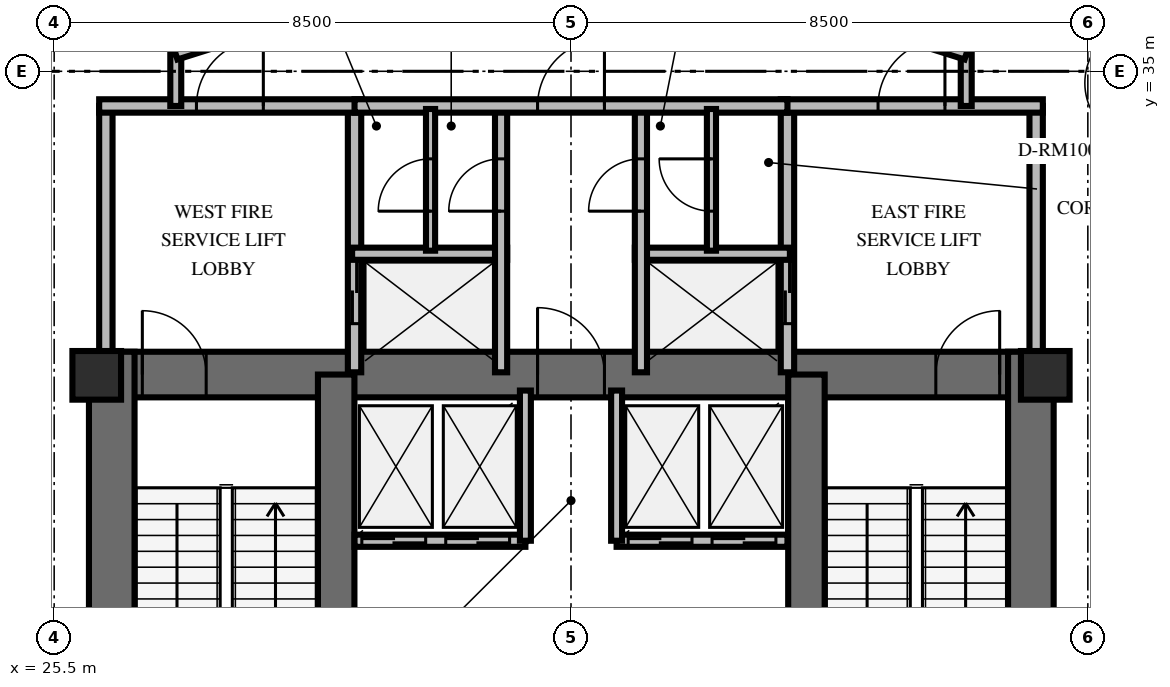
"""IFC4 building model, lengths in metres.
Left out: names, types, materials, properties, quantities, classifications, styles, units other than length and angle.
Written with IfcOpenShell. Run it as: python <this file> out.ifc"""

import sys

from ifc_helpers import new_model, si_unit, direction, frame, frame_2d, origin, origin_2d, place, context, subcontext, project, spatial, rectangle, extrude, element, fill, save


model = new_model("IFC4")
c1 = context("Model", 3, precision=1e-05, world=origin(), true_north=direction((0.0, 1.0)))
c2 = subcontext(c1, "Body", "Model", "MODEL_VIEW")
j1 = project(units=[si_unit("LENGTHUNIT", "METRE"), si_unit("PLANEANGLEUNIT", "RADIAN")], contexts=[c1])
p1 = place(None, origin())
s1 = spatial("IfcSite", under=j1, at=p1, CompositionType="ELEMENT")
p2 = place(p1, origin())
s2 = spatial("IfcBuilding", under=s1, at=p2, CompositionType="ELEMENT")
p3 = place(p2, frame((0.0, 0.0, 177.2)))
s3 = spatial("IfcBuildingStorey", under=s2, at=p3, CompositionType="ELEMENT", Elevation=177.2)
p4 = place(p3, frame((26.072, 30.013, 0.0), z_axis=(0.0, 0.0, 1.0), x_axis=(1.0, 0.0, 0.0)))
e1 = element("IfcWall", 1, at=p4, inside=s3, PredefinedType="SHEAR", context=c2, shape_type="SweptSolid", body=[
    extrude(rectangle(XDim=15.866, YDim=0.75, at=frame_2d((7.933, 0.0))), origin(), (0.0, 0.0, 1.0), 3.6),
])
p5 = place(p4, frame((0.878, 0.0, 0.0)))
e2 = element("IfcOpeningElement", 2, at=p5, cuts=e1, PredefinedType="OPENING", context=c2, shape_type="SweptSolid", body=[
    extrude(rectangle(XDim=1.05, YDim=2.15, at=frame_2d((0.525, 1.075))), frame((0.0, 0.385, 0.0), z_axis=(0.0, -1.0, 0.0), x_axis=(1.0, 0.0, 0.0)), (0.0, 0.0, 1.0), 0.77),
])
p6 = place(p4, frame((13.928, 0.0, 0.0)))
e3 = element("IfcOpeningElement", 3, at=p6, cuts=e1, PredefinedType="OPENING", context=c2, shape_type="SweptSolid", body=[
    extrude(rectangle(XDim=1.05, YDim=2.15, at=frame_2d((0.525, 1.075))), frame((0.0, 0.385, 0.0), z_axis=(0.0, -1.0, 0.0), x_axis=(1.0, 0.0, 0.0)), (0.0, 0.0, 1.0), 0.77),
])
p7 = place(p4, frame((7.378, 0.0, 0.0)))
e4 = element("IfcOpeningElement", 4, at=p7, cuts=e1, PredefinedType="OPENING", context=c2, shape_type="SweptSolid", body=[
    extrude(rectangle(XDim=1.1, YDim=2.15, at=frame_2d((0.55, 1.075))), frame((0.0, 0.385, 0.0), z_axis=(0.0, -1.0, 0.0), x_axis=(1.0, 0.0, 0.0)), (0.0, 0.0, 1.0), 0.77),
])
for number, where, z_axis, x_axis in (
    (5, (26.447, 19.812, 0.0), (0.0, 0.0, 1.0), (0.0, 1.0, 0.0)),
    (6, (41.563, 19.812, 0.0), (0.0, 0.0, 1.0), (0.0, 1.0, 0.0)),
):
    element("IfcWall", number, at=place(p3, frame(where, z_axis=z_axis, x_axis=x_axis)), inside=s3, PredefinedType="SHEAR", context=c2, shape_type="SweptSolid", body=[
        extrude(rectangle(XDim=10.576, YDim=0.75, at=frame_2d((5.288, 0.0))), origin(), (0.0, 0.0, 1.0), 3.6),
    ])
for number, where, z_axis, x_axis in (
    (7, (30.138, 20.187, 0.0), (0.0, 0.0, 1.0), (0.0, 1.0, 0.0)),
    (8, (37.872, 20.187, 0.0), (0.0, 0.0, 1.0), (0.0, 1.0, 0.0)),
):
    element("IfcWall", number, at=place(p3, frame(where, z_axis=z_axis, x_axis=x_axis)), inside=s3, PredefinedType="SHEAR", context=c2, shape_type="SweptSolid", body=[
        extrude(rectangle(XDim=9.826, YDim=0.6, at=frame_2d((4.913, 0.0))), origin(), (0.0, 0.0, 1.0), 3.6),
    ])
for number, where, z_axis, x_axis in (
    (9, (26.2, 30.0, 0.0), (0.0, 0.0, 1.0), (1.0, 0.0, 0.0)),
    (10, (41.8, 30.0, 0.0), (0.0, 0.0, 1.0), (1.0, 0.0, 0.0)),
):
    element("IfcColumn", number, at=place(p3, frame(where, z_axis=z_axis, x_axis=x_axis)), inside=s3, PredefinedType="PILASTER", context=c2, shape_type="SweptSolid", body=[
        extrude(rectangle(XDim=0.8, YDim=0.8, at=origin_2d()), origin(), (0.0, 0.0, 1.0), 3.6),
    ])
p8 = place(p3, frame((26.35, 30.05, 0.0), z_axis=(0.0, 0.0, 1.0), x_axis=(0.0, 1.0, 0.0)))
e11 = element("IfcWall", 11, at=p8, inside=s3, PredefinedType="SOLIDWALL", context=c2, shape_type="SweptSolid", body=[
    extrude(rectangle(XDim=4.38, YDim=0.22, at=frame_2d((2.19, 0.0))), origin(), (0.0, 0.0, 1.0), 2.46),
])
p9 = place(p3, frame((30.44, 30.05, 0.0), z_axis=(0.0, 0.0, 1.0), x_axis=(0.0, 1.0, 0.0)))
e12 = element("IfcWall", 12, at=p9, inside=s3, PredefinedType="SOLIDWALL", context=c2, shape_type="SweptSolid", body=[
    extrude(rectangle(XDim=4.38, YDim=0.22, at=frame_2d((2.19, 0.0))), origin(), (0.0, 0.0, 1.0), 2.46),
])
p10 = place(p9, frame((0.8, 0.0, 0.0)))
e13 = element("IfcOpeningElement", 13, at=p10, cuts=e12, PredefinedType="OPENING", context=c2, shape_type="SweptSolid", body=[
    extrude(rectangle(XDim=1.05, YDim=2.1, at=frame_2d((0.525, 1.05))), frame((0.0, 0.12, 0.0), z_axis=(0.0, -1.0, 0.0), x_axis=(1.0, 0.0, 0.0)), (0.0, 0.0, 1.0), 0.24),
])
p11 = place(p3, frame((26.24, 34.43, 0.0), z_axis=(0.0, 0.0, 1.0), x_axis=(1.0, 0.0, 0.0)))
e14 = element("IfcWall", 14, at=p11, inside=s3, PredefinedType="SOLIDWALL", context=c2, shape_type="SweptSolid", body=[
    extrude(rectangle(XDim=4.31, YDim=0.22, at=frame_2d((2.155, 0.0))), origin(), (0.0, 0.0, 1.0), 2.46),
])
p12 = place(p11, frame((1.6, 0.0, 0.0)))
e15 = element("IfcOpeningElement", 15, at=p12, cuts=e14, PredefinedType="OPENING", context=c2, shape_type="SweptSolid", body=[
    extrude(rectangle(XDim=1.1, YDim=2.15, at=frame_2d((0.55, 1.075))), frame((0.0, 0.12, 0.0), z_axis=(0.0, -1.0, 0.0), x_axis=(1.0, 0.0, 0.0)), (0.0, 0.0, 1.0), 0.24),
])
p13 = place(p3, frame((30.4, 32.0, 0.0), z_axis=(0.0, 0.0, 1.0), x_axis=(1.0, 0.0, 0.0)))
e16 = element("IfcWall", 16, at=p13, inside=s3, PredefinedType="SOLIDWALL", context=c2, shape_type="SweptSolid", body=[
    extrude(rectangle(XDim=2.55, YDim=0.2, at=frame_2d((1.275, 0.0))), origin(), (0.0, 0.0, 1.0), 2.46),
])
p14 = place(p3, frame((32.85, 30.05, 0.0), z_axis=(0.0, 0.0, 1.0), x_axis=(0.0, 1.0, 0.0)))
e17 = element("IfcWall", 17, at=p14, inside=s3, PredefinedType="SOLIDWALL", context=c2, shape_type="SweptSolid", body=[
    extrude(rectangle(XDim=4.38, YDim=0.2, at=frame_2d((2.19, 0.0))), origin(), (0.0, 0.0, 1.0), 2.46),
])
p15 = place(p14, frame((2.65, 0.0, 0.0)))
e18 = element("IfcOpeningElement", 18, at=p15, cuts=e17, PredefinedType="OPENING", context=c2, shape_type="SweptSolid", body=[
    extrude(rectangle(XDim=0.86, YDim=2.05, at=frame_2d((0.43, 1.025))), frame((0.0, 0.11, 0.0), z_axis=(0.0, -1.0, 0.0), x_axis=(1.0, 0.0, 0.0)), (0.0, 0.0, 1.0), 0.22),
])
p16 = place(p3, frame((37.56, 30.05, 0.0), z_axis=(0.0, 0.0, 1.0), x_axis=(0.0, 1.0, 0.0)))
e19 = element("IfcWall", 19, at=p16, inside=s3, PredefinedType="SOLIDWALL", context=c2, shape_type="SweptSolid", body=[
    extrude(rectangle(XDim=4.38, YDim=0.22, at=frame_2d((2.19, 0.0))), origin(), (0.0, 0.0, 1.0), 2.46),
])
p17 = place(p16, frame((0.8, 0.0, 0.0)))
e20 = element("IfcOpeningElement", 20, at=p17, cuts=e19, PredefinedType="OPENING", context=c2, shape_type="SweptSolid", body=[
    extrude(rectangle(XDim=1.05, YDim=2.1, at=frame_2d((0.525, 1.05))), frame((0.0, 0.12, 0.0), z_axis=(0.0, -1.0, 0.0), x_axis=(1.0, 0.0, 0.0)), (0.0, 0.0, 1.0), 0.24),
])
p18 = place(p3, frame((41.65, 30.05, 0.0), z_axis=(0.0, 0.0, 1.0), x_axis=(0.0, 1.0, 0.0)))
e21 = element("IfcWall", 21, at=p18, inside=s3, PredefinedType="SOLIDWALL", context=c2, shape_type="SweptSolid", body=[
    extrude(rectangle(XDim=4.38, YDim=0.22, at=frame_2d((2.19, 0.0))), origin(), (0.0, 0.0, 1.0), 2.46),
])
p19 = place(p3, frame((37.45, 34.43, 0.0), z_axis=(0.0, 0.0, 1.0), x_axis=(1.0, 0.0, 0.0)))
e22 = element("IfcWall", 22, at=p19, inside=s3, PredefinedType="SOLIDWALL", context=c2, shape_type="SweptSolid", body=[
    extrude(rectangle(XDim=4.31, YDim=0.22, at=frame_2d((2.155, 0.0))), origin(), (0.0, 0.0, 1.0), 2.46),
])
p20 = place(p19, frame((1.6, 0.0, 0.0)))
e23 = element("IfcOpeningElement", 23, at=p20, cuts=e22, PredefinedType="OPENING", context=c2, shape_type="SweptSolid", body=[
    extrude(rectangle(XDim=1.1, YDim=2.15, at=frame_2d((0.55, 1.075))), frame((0.0, 0.12, 0.0), z_axis=(0.0, -1.0, 0.0), x_axis=(1.0, 0.0, 0.0)), (0.0, 0.0, 1.0), 0.24),
])
p21 = place(p3, frame((35.05, 32.0, 0.0), z_axis=(0.0, 0.0, 1.0), x_axis=(1.0, 0.0, 0.0)))
e24 = element("IfcWall", 24, at=p21, inside=s3, PredefinedType="SOLIDWALL", context=c2, shape_type="SweptSolid", body=[
    extrude(rectangle(XDim=2.55, YDim=0.2, at=frame_2d((1.275, 0.0))), origin(), (0.0, 0.0, 1.0), 2.46),
])
p22 = place(p3, frame((35.15, 30.05, 0.0), z_axis=(0.0, 0.0, 1.0), x_axis=(0.0, 1.0, 0.0)))
e25 = element("IfcWall", 25, at=p22, inside=s3, PredefinedType="SOLIDWALL", context=c2, shape_type="SweptSolid", body=[
    extrude(rectangle(XDim=4.38, YDim=0.2, at=frame_2d((2.19, 0.0))), origin(), (0.0, 0.0, 1.0), 2.46),
])
p23 = place(p22, frame((2.65, 0.0, 0.0)))
e26 = element("IfcOpeningElement", 26, at=p23, cuts=e25, PredefinedType="OPENING", context=c2, shape_type="SweptSolid", body=[
    extrude(rectangle(XDim=0.86, YDim=2.05, at=frame_2d((0.43, 1.025))), frame((0.0, 0.11, 0.0), z_axis=(0.0, -1.0, 0.0), x_axis=(1.0, 0.0, 0.0)), (0.0, 0.0, 1.0), 0.22),
])
p24 = place(p3, frame((30.44, 34.43, 0.0), z_axis=(0.0, 0.0, 1.0), x_axis=(1.0, 0.0, 0.0)))
e27 = element("IfcWall", 27, at=p24, inside=s3, PredefinedType="SOLIDWALL", context=c2, shape_type="SweptSolid", body=[
    extrude(rectangle(XDim=7.12, YDim=0.22, at=frame_2d((3.56, 0.0))), origin(), (0.0, 0.0, 1.0), 2.46),
])
p25 = place(p24, frame((3.01, 0.0, 0.0)))
e28 = element("IfcOpeningElement", 28, at=p25, cuts=e27, PredefinedType="OPENING", context=c2, shape_type="SweptSolid", body=[
    extrude(rectangle(XDim=1.1, YDim=2.15, at=frame_2d((0.55, 1.075))), frame((0.0, 0.12, 0.0), z_axis=(0.0, -1.0, 0.0), x_axis=(1.0, 0.0, 0.0)), (0.0, 0.0, 1.0), 0.24),
])
p26 = place(p3, frame((31.69, 32.05, 0.0), z_axis=(0.0, 0.0, 1.0), x_axis=(0.0, 1.0, 0.0)))
e29 = element("IfcWall", 29, at=p26, inside=s3, PredefinedType="PARTITIONING", context=c2, shape_type="SweptSolid", body=[
    extrude(rectangle(XDim=2.33, YDim=0.15, at=frame_2d((1.165, 0.0))), origin(), (0.0, 0.0, 1.0), 2.46),
])
p27 = place(p26, frame((0.65, 0.0, 0.0)))
e30 = element("IfcOpeningElement", 30, at=p27, cuts=e29, PredefinedType="OPENING", context=c2, shape_type="SweptSolid", body=[
    extrude(rectangle(XDim=0.86, YDim=2.05, at=frame_2d((0.43, 1.025))), frame((0.0, 0.085, 0.0), z_axis=(0.0, -1.0, 0.0), x_axis=(1.0, 0.0, 0.0)), (0.0, 0.0, 1.0), 0.17),
])
p28 = place(p3, frame((36.31, 32.05, 0.0), z_axis=(0.0, 0.0, 1.0), x_axis=(0.0, 1.0, 0.0)))
e31 = element("IfcWall", 31, at=p28, inside=s3, PredefinedType="PARTITIONING", context=c2, shape_type="SweptSolid", body=[
    extrude(rectangle(XDim=2.33, YDim=0.15, at=frame_2d((1.165, 0.0))), origin(), (0.0, 0.0, 1.0), 2.46),
])
p29 = place(p28, frame((0.65, 0.0, 0.0)))
e32 = element("IfcOpeningElement", 32, at=p29, cuts=e31, PredefinedType="OPENING", context=c2, shape_type="SweptSolid", body=[
    extrude(rectangle(XDim=0.86, YDim=2.05, at=frame_2d((0.43, 1.025))), frame((0.0, 0.085, 0.0), z_axis=(0.0, -1.0, 0.0), x_axis=(1.0, 0.0, 0.0)), (0.0, 0.0, 1.0), 0.17),
])
p30 = place(p3, frame((30.44, 27.28, 0.0), z_axis=(0.0, 0.0, 1.0), x_axis=(1.0, 0.0, 0.0)))
e33 = element("IfcWall", 33, at=p30, inside=s3, PredefinedType="SOLIDWALL", context=c2, shape_type="SweptSolid", body=[
    extrude(rectangle(XDim=2.81, YDim=0.2, at=frame_2d((1.405, 0.0))), origin(), (0.0, 0.0, 1.0), 2.46),
])
p31 = place(p30, frame((0.12, 0.0, 0.0)))
e34 = element("IfcOpeningElement", 34, at=p31, cuts=e33, PredefinedType="OPENING", context=c2, shape_type="SweptSolid", body=[
    extrude(rectangle(XDim=1.05, YDim=2.1, at=frame_2d((0.525, 1.05))), frame((0.0, 0.11, 0.0), z_axis=(0.0, -1.0, 0.0), x_axis=(1.0, 0.0, 0.0)), (0.0, 0.0, 1.0), 0.22),
])
p32 = place(p30, frame((1.5, 0.0, 0.0)))
e35 = element("IfcOpeningElement", 35, at=p32, cuts=e33, PredefinedType="OPENING", context=c2, shape_type="SweptSolid", body=[
    extrude(rectangle(XDim=1.05, YDim=2.1, at=frame_2d((0.525, 1.05))), frame((0.0, 0.11, 0.0), z_axis=(0.0, -1.0, 0.0), x_axis=(1.0, 0.0, 0.0)), (0.0, 0.0, 1.0), 0.22),
])
p33 = place(p3, frame((33.25, 27.28, 0.0), z_axis=(0.0, 0.0, 1.0), x_axis=(0.0, 1.0, 0.0)))
e36 = element("IfcWall", 36, at=p33, inside=s3, PredefinedType="SOLIDWALL", context=c2, shape_type="SweptSolid", body=[
    extrude(rectangle(XDim=2.47, YDim=0.18, at=frame_2d((1.235, 0.0))), origin(), (0.0, 0.0, 1.0), 2.46),
])
p34 = place(p3, frame((34.75, 27.28, 0.0), z_axis=(0.0, 0.0, 1.0), x_axis=(1.0, 0.0, 0.0)))
e37 = element("IfcWall", 37, at=p34, inside=s3, PredefinedType="SOLIDWALL", context=c2, shape_type="SweptSolid", body=[
    extrude(rectangle(XDim=2.81, YDim=0.2, at=frame_2d((1.405, 0.0))), origin(), (0.0, 0.0, 1.0), 2.46),
])
p35 = place(p34, frame((0.19, 0.0, 0.0)))
e38 = element("IfcOpeningElement", 38, at=p35, cuts=e37, PredefinedType="OPENING", context=c2, shape_type="SweptSolid", body=[
    extrude(rectangle(XDim=1.05, YDim=2.1, at=frame_2d((0.525, 1.05))), frame((0.0, 0.11, 0.0), z_axis=(0.0, -1.0, 0.0), x_axis=(1.0, 0.0, 0.0)), (0.0, 0.0, 1.0), 0.22),
])
p36 = place(p34, frame((1.57, 0.0, 0.0)))
e39 = element("IfcOpeningElement", 39, at=p36, cuts=e37, PredefinedType="OPENING", context=c2, shape_type="SweptSolid", body=[
    extrude(rectangle(XDim=1.05, YDim=2.1, at=frame_2d((0.525, 1.05))), frame((0.0, 0.11, 0.0), z_axis=(0.0, -1.0, 0.0), x_axis=(1.0, 0.0, 0.0)), (0.0, 0.0, 1.0), 0.22),
])
p37 = place(p3, frame((34.75, 27.28, 0.0), z_axis=(0.0, 0.0, 1.0), x_axis=(0.0, 1.0, 0.0)))
e40 = element("IfcWall", 40, at=p37, inside=s3, PredefinedType="SOLIDWALL", context=c2, shape_type="SweptSolid", body=[
    extrude(rectangle(XDim=2.47, YDim=0.18, at=frame_2d((1.235, 0.0))), origin(), (0.0, 0.0, 1.0), 2.46),
])
for number, where, z_axis, x_axis in (
    (41, (27.5, 34.43, 0.0), (0.0, 0.0, 1.0), (0.0, 1.0, 0.0)),
    (42, (40.5, 35.28, 0.0), (0.0, 0.0, 1.0), (0.0, -1.0, 0.0)),
):
    element("IfcWall", number, at=place(p3, frame(where, z_axis=z_axis, x_axis=x_axis)), inside=s3, PredefinedType="PARTITIONING", context=c2, shape_type="SweptSolid", body=[
        extrude(rectangle(XDim=0.85, YDim=0.18, at=frame_2d((0.425, 0.0))), origin(), (0.0, 0.0, 1.0), 2.46),
    ])
p38 = place(p3, frame((27.5, 35.28, 0.0), z_axis=(0.0, 0.0, 1.0), x_axis=(0.953691418528, 0.300786765376, 0.0)))
e43 = element("IfcWall", 43, at=p38, inside=s3, PredefinedType="PARTITIONING", context=c2, shape_type="SweptSolid", body=[
    extrude(rectangle(XDim=6.816, YDim=0.18, at=frame_2d((3.408, 0.0))), origin(), (0.0, 0.0, 1.0), 2.46),
])
p39 = place(p38, frame((2.858, 0.0, 0.0)))
e44 = element("IfcOpeningElement", 44, at=p39, cuts=e43, PredefinedType="OPENING", context=c2, shape_type="SweptSolid", body=[
    extrude(rectangle(XDim=1.1, YDim=2.15, at=frame_2d((0.55, 1.075))), frame((0.0, 0.1, 0.0), z_axis=(0.0, -1.0, 0.0), x_axis=(1.0, 0.0, 0.0)), (0.0, 0.0, 1.0), 0.2),
])
p40 = place(p3, frame((34.0, 37.33, 0.0), z_axis=(0.0, 0.0, 1.0), x_axis=(0.953691418528, -0.300786765376, 0.0)))
e45 = element("IfcWall", 45, at=p40, inside=s3, PredefinedType="PARTITIONING", context=c2, shape_type="SweptSolid", body=[
    extrude(rectangle(XDim=6.816, YDim=0.18, at=frame_2d((3.408, 0.0))), origin(), (0.0, 0.0, 1.0), 2.46),
])
p41 = place(p40, frame((2.858, 0.0, 0.0)))
e46 = element("IfcOpeningElement", 46, at=p41, cuts=e45, PredefinedType="OPENING", context=c2, shape_type="SweptSolid", body=[
    extrude(rectangle(XDim=1.1, YDim=2.15, at=frame_2d((0.55, 1.075))), frame((0.0, 0.1, 0.0), z_axis=(0.0, -1.0, 0.0), x_axis=(1.0, 0.0, 0.0)), (0.0, 0.0, 1.0), 0.2),
])
p42 = place(p3, frame((44.547, 33.719, 0.0), z_axis=(0.0, 0.0, 1.0), x_axis=(-0.709580149613, 0.704624730815, 0.0)))
e47 = element("IfcWall", 47, at=p42, inside=s3, PredefinedType="PARTITIONING", context=c2, shape_type="SweptSolid", body=[
    extrude(rectangle(XDim=4.089, YDim=0.18, at=frame_2d((2.044, 0.0))), origin(), (0.0, 0.0, 1.0), 2.46),
])
p43 = place(p42, frame((1.545, 0.0, 0.0)))
e48 = element("IfcOpeningElement", 48, at=p43, cuts=e47, PredefinedType="OPENING", context=c2, shape_type="SweptSolid", body=[
    extrude(rectangle(XDim=1.0, YDim=2.15, at=frame_2d((0.5, 1.075))), frame((0.0, 0.1, 0.0), z_axis=(0.0, -1.0, 0.0), x_axis=(1.0, 0.0, 0.0)), (0.0, 0.0, 1.0), 0.2),
])
p44 = place(p3, frame((28.642, 37.921, 0.0), z_axis=(0.0, 0.0, 1.0), x_axis=(-0.82708553546, -0.56207607762, 0.0)))
e49 = element("IfcWall", 49, at=p44, inside=s3, PredefinedType="PARTITIONING", context=c2, shape_type="SweptSolid", body=[
    extrude(rectangle(XDim=4.539, YDim=0.18, at=frame_2d((2.27, 0.0))), origin(), (0.0, 0.0, 1.0), 2.46),
])
p45 = place(p5, origin())
e50 = element("IfcDoor", 50, at=p45, inside=s3, OperationType="SINGLE_SWING_LEFT", PredefinedType="DOOR", context=c2, shape_type="SweptSolid", body=[
    extrude(rectangle(XDim=1.05, YDim=2.15, at=frame_2d((0.525, 1.075))), frame((0.0, 0.025, 0.0), z_axis=(0.0, -1.0, 0.0), x_axis=(1.0, 0.0, 0.0)), (0.0, 0.0, 1.0), 0.05),
])
fill(e2, e50)
p46 = place(p6, origin())
e51 = element("IfcDoor", 51, at=p46, inside=s3, OperationType="SINGLE_SWING_RIGHT", PredefinedType="DOOR", context=c2, shape_type="SweptSolid", body=[
    extrude(rectangle(XDim=1.05, YDim=2.15, at=frame_2d((0.525, 1.075))), frame((0.0, 0.025, 0.0), z_axis=(0.0, -1.0, 0.0), x_axis=(1.0, 0.0, 0.0)), (0.0, 0.0, 1.0), 0.05),
])
fill(e3, e51)
p47 = place(p7, origin())
e52 = element("IfcDoor", 52, at=p47, inside=s3, OperationType="SINGLE_SWING_LEFT", PredefinedType="DOOR", context=c2, shape_type="SweptSolid", body=[
    extrude(rectangle(XDim=1.1, YDim=2.15, at=frame_2d((0.55, 1.075))), frame((0.0, 0.025, 0.0), z_axis=(0.0, -1.0, 0.0), x_axis=(1.0, 0.0, 0.0)), (0.0, 0.0, 1.0), 0.05),
])
fill(e4, e52)
p48 = place(p12, origin())
e53 = element("IfcDoor", 53, at=p48, inside=s3, OperationType="SINGLE_SWING_RIGHT", PredefinedType="DOOR", context=c2, shape_type="SweptSolid", body=[
    extrude(rectangle(XDim=1.1, YDim=2.15, at=frame_2d((0.55, 1.075))), frame((0.0, 0.025, 0.0), z_axis=(0.0, -1.0, 0.0), x_axis=(1.0, 0.0, 0.0)), (0.0, 0.0, 1.0), 0.05),
])
fill(e15, e53)
p49 = place(p10, origin())
e54 = element("IfcDoor", 54, at=p49, inside=s3, OperationType="DOUBLE_DOOR_SLIDING", PredefinedType="USERDEFINED", context=c2, shape_type="SweptSolid", body=[
    extrude(rectangle(XDim=1.05, YDim=2.1, at=frame_2d((0.525, 1.05))), frame((0.0, 0.025, 0.0), z_axis=(0.0, -1.0, 0.0), x_axis=(1.0, 0.0, 0.0)), (0.0, 0.0, 1.0), 0.05),
])
fill(e13, e54)
p50 = place(p15, origin())
e55 = element("IfcDoor", 55, at=p50, inside=s3, OperationType="SINGLE_SWING_LEFT", PredefinedType="TRAPDOOR", context=c2, shape_type="SweptSolid", body=[
    extrude(rectangle(XDim=0.86, YDim=2.05, at=frame_2d((0.43, 1.025))), frame((0.0, 0.025, 0.0), z_axis=(0.0, -1.0, 0.0), x_axis=(1.0, 0.0, 0.0)), (0.0, 0.0, 1.0), 0.05),
])
fill(e18, e55)
p51 = place(p20, origin())
e56 = element("IfcDoor", 56, at=p51, inside=s3, OperationType="SINGLE_SWING_RIGHT", PredefinedType="DOOR", context=c2, shape_type="SweptSolid", body=[
    extrude(rectangle(XDim=1.1, YDim=2.15, at=frame_2d((0.55, 1.075))), frame((0.0, 0.025, 0.0), z_axis=(0.0, -1.0, 0.0), x_axis=(1.0, 0.0, 0.0)), (0.0, 0.0, 1.0), 0.05),
])
fill(e23, e56)
p52 = place(p17, origin())
e57 = element("IfcDoor", 57, at=p52, inside=s3, OperationType="DOUBLE_DOOR_SLIDING", PredefinedType="USERDEFINED", context=c2, shape_type="SweptSolid", body=[
    extrude(rectangle(XDim=1.05, YDim=2.1, at=frame_2d((0.525, 1.05))), frame((0.0, 0.025, 0.0), z_axis=(0.0, -1.0, 0.0), x_axis=(1.0, 0.0, 0.0)), (0.0, 0.0, 1.0), 0.05),
])
fill(e20, e57)
p53 = place(p23, origin())
e58 = element("IfcDoor", 58, at=p53, inside=s3, OperationType="SINGLE_SWING_LEFT", PredefinedType="TRAPDOOR", context=c2, shape_type="SweptSolid", body=[
    extrude(rectangle(XDim=0.86, YDim=2.05, at=frame_2d((0.43, 1.025))), frame((0.0, 0.025, 0.0), z_axis=(0.0, -1.0, 0.0), x_axis=(1.0, 0.0, 0.0)), (0.0, 0.0, 1.0), 0.05),
])
fill(e26, e58)
p54 = place(p25, origin())
e59 = element("IfcDoor", 59, at=p54, inside=s3, OperationType="SINGLE_SWING_RIGHT", PredefinedType="DOOR", context=c2, shape_type="SweptSolid", body=[
    extrude(rectangle(XDim=1.1, YDim=2.15, at=frame_2d((0.55, 1.075))), frame((0.0, 0.025, 0.0), z_axis=(0.0, -1.0, 0.0), x_axis=(1.0, 0.0, 0.0)), (0.0, 0.0, 1.0), 0.05),
])
fill(e28, e59)
p55 = place(p27, origin())
e60 = element("IfcDoor", 60, at=p55, inside=s3, OperationType="SINGLE_SWING_LEFT", PredefinedType="TRAPDOOR", context=c2, shape_type="SweptSolid", body=[
    extrude(rectangle(XDim=0.86, YDim=2.05, at=frame_2d((0.43, 1.025))), frame((0.0, 0.025, 0.0), z_axis=(0.0, -1.0, 0.0), x_axis=(1.0, 0.0, 0.0)), (0.0, 0.0, 1.0), 0.05),
])
fill(e30, e60)
p56 = place(p29, origin())
e61 = element("IfcDoor", 61, at=p56, inside=s3, OperationType="SINGLE_SWING_RIGHT", PredefinedType="TRAPDOOR", context=c2, shape_type="SweptSolid", body=[
    extrude(rectangle(XDim=0.86, YDim=2.05, at=frame_2d((0.43, 1.025))), frame((0.0, 0.025, 0.0), z_axis=(0.0, -1.0, 0.0), x_axis=(1.0, 0.0, 0.0)), (0.0, 0.0, 1.0), 0.05),
])
fill(e32, e61)
p57 = place(p31, origin())
e62 = element("IfcDoor", 62, at=p57, inside=s3, OperationType="DOUBLE_DOOR_SLIDING", PredefinedType="USERDEFINED", context=c2, shape_type="SweptSolid", body=[
    extrude(rectangle(XDim=1.05, YDim=2.1, at=frame_2d((0.525, 1.05))), frame((0.0, 0.025, 0.0), z_axis=(0.0, -1.0, 0.0), x_axis=(1.0, 0.0, 0.0)), (0.0, 0.0, 1.0), 0.05),
])
fill(e34, e62)
p58 = place(p32, origin())
e63 = element("IfcDoor", 63, at=p58, inside=s3, OperationType="DOUBLE_DOOR_SLIDING", PredefinedType="USERDEFINED", context=c2, shape_type="SweptSolid", body=[
    extrude(rectangle(XDim=1.05, YDim=2.1, at=frame_2d((0.525, 1.05))), frame((0.0, 0.025, 0.0), z_axis=(0.0, -1.0, 0.0), x_axis=(1.0, 0.0, 0.0)), (0.0, 0.0, 1.0), 0.05),
])
fill(e35, e63)
p59 = place(p35, origin())
e64 = element("IfcDoor", 64, at=p59, inside=s3, OperationType="DOUBLE_DOOR_SLIDING", PredefinedType="USERDEFINED", context=c2, shape_type="SweptSolid", body=[
    extrude(rectangle(XDim=1.05, YDim=2.1, at=frame_2d((0.525, 1.05))), frame((0.0, 0.025, 0.0), z_axis=(0.0, -1.0, 0.0), x_axis=(1.0, 0.0, 0.0)), (0.0, 0.0, 1.0), 0.05),
])
fill(e38, e64)
p60 = place(p36, origin())
e65 = element("IfcDoor", 65, at=p60, inside=s3, OperationType="DOUBLE_DOOR_SLIDING", PredefinedType="USERDEFINED", context=c2, shape_type="SweptSolid", body=[
    extrude(rectangle(XDim=1.05, YDim=2.1, at=frame_2d((0.525, 1.05))), frame((0.0, 0.025, 0.0), z_axis=(0.0, -1.0, 0.0), x_axis=(1.0, 0.0, 0.0)), (0.0, 0.0, 1.0), 0.05),
])
fill(e39, e65)
save(model, sys.argv[1])
